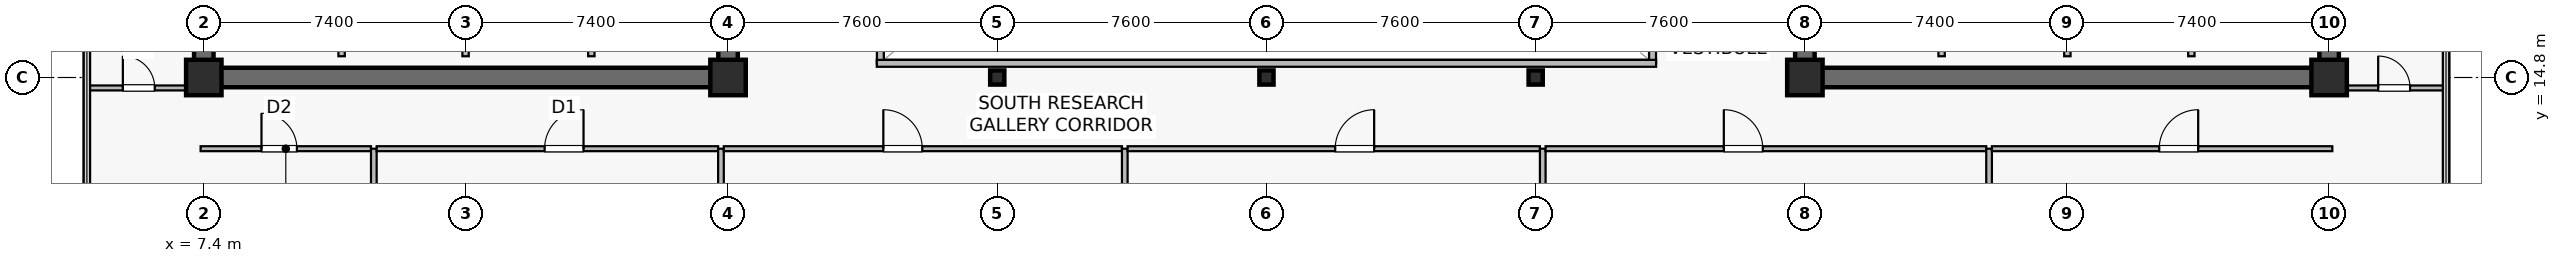
"""IFC4 building model, lengths in metres.
Left out: names, types, materials, properties, quantities, classifications, styles, units other than length and angle.
Written with IfcOpenShell. Run it as: python <this file> out.ifc"""

import sys

from ifc_helpers import new_model, si_unit, direction, frame, frame_2d, origin, origin_2d, place, context, subcontext, project, spatial, rectangle, hollow_rectangle, extrude, source, transform, mapped, element, fill, save


model = new_model("IFC4")
c1 = context("Model", 3, precision=1e-05, world=origin(), true_north=direction((0.0, 1.0)))
c2 = subcontext(c1, "Body", "Model", "MODEL_VIEW")
j1 = project(units=[si_unit("LENGTHUNIT", "METRE"), si_unit("PLANEANGLEUNIT", "RADIAN")], contexts=[c1])
p1 = place(None, origin())
s1 = spatial("IfcSite", under=j1, at=p1, CompositionType="ELEMENT")
p2 = place(p1, origin())
s2 = spatial("IfcBuilding", under=s1, at=p2, CompositionType="ELEMENT")
p3 = place(p2, frame((0.0, 0.0, 209.6)))
s3 = spatial("IfcBuildingStorey", under=s2, at=p3, CompositionType="ELEMENT", Elevation=209.6)
p4 = place(p3, frame((7.125, 14.8, 0.0), z_axis=(0.0, 0.0, 1.0), x_axis=(1.0, 0.0, 0.0)))
e1 = element("IfcWall", 1, at=p4, inside=s3, PredefinedType="SHEAR", context=c2, shape_type="SweptSolid", body=[
    extrude(rectangle(XDim=15.35, YDim=0.55, at=frame_2d((7.675, 0.0))), origin(), (0.0, 0.0, 1.0), 3.8),
])
p5 = place(p3, frame((7.4, 15.075, 0.0), z_axis=(0.0, 0.0, 1.0), x_axis=(0.0, 1.0, 0.0)))
e2 = element("IfcWall", 2, at=p5, inside=s3, PredefinedType="SHEAR", context=c2, shape_type="SweptSolid", body=[
    extrude(rectangle(XDim=18.45, YDim=0.55, at=frame_2d((9.225, 0.0))), origin(), (0.0, 0.0, 1.0), 3.8),
])
p6 = place(p3, frame((22.2, 15.075, 0.0), z_axis=(0.0, 0.0, 1.0), x_axis=(0.0, 1.0, 0.0)))
e3 = element("IfcWall", 3, at=p6, inside=s3, PredefinedType="SHEAR", context=c2, shape_type="SweptSolid", body=[
    extrude(rectangle(XDim=18.45, YDim=0.55, at=frame_2d((9.225, 0.0))), origin(), (0.0, 0.0, 1.0), 3.8),
])
p7 = place(p6, frame((3.475, 0.0, 0.0)))
e4 = element("IfcOpeningElement", 4, at=p7, cuts=e3, PredefinedType="OPENING", context=c2, shape_type="SweptSolid", body=[
    extrude(rectangle(XDim=1.42, YDim=2.2, at=frame_2d((0.71, 1.1))), frame((0.0, 0.285, 0.0), z_axis=(0.0, -1.0, 0.0), x_axis=(1.0, 0.0, 0.0)), (0.0, 0.0, 1.0), 0.57),
])
p8 = place(p3, frame((52.325, 14.8, 0.0), z_axis=(0.0, 0.0, 1.0), x_axis=(1.0, 0.0, 0.0)))
e5 = element("IfcWall", 5, at=p8, inside=s3, PredefinedType="SHEAR", context=c2, shape_type="SweptSolid", body=[
    extrude(rectangle(XDim=15.35, YDim=0.55, at=frame_2d((7.675, 0.0))), origin(), (0.0, 0.0, 1.0), 3.8),
])
p9 = place(p3, frame((52.6, 15.075, 0.0), z_axis=(0.0, 0.0, 1.0), x_axis=(0.0, 1.0, 0.0)))
e6 = element("IfcWall", 6, at=p9, inside=s3, PredefinedType="SHEAR", context=c2, shape_type="SweptSolid", body=[
    extrude(rectangle(XDim=18.45, YDim=0.55, at=frame_2d((9.225, 0.0))), origin(), (0.0, 0.0, 1.0), 3.8),
])
p10 = place(p9, frame((3.475, 0.0, 0.0)))
e7 = element("IfcOpeningElement", 7, at=p10, cuts=e6, PredefinedType="OPENING", context=c2, shape_type="SweptSolid", body=[
    extrude(rectangle(XDim=1.42, YDim=2.2, at=frame_2d((0.71, 1.1))), frame((0.0, 0.285, 0.0), z_axis=(0.0, -1.0, 0.0), x_axis=(1.0, 0.0, 0.0)), (0.0, 0.0, 1.0), 0.57),
])
p11 = place(p3, frame((67.4, 15.075, 0.0), z_axis=(0.0, 0.0, 1.0), x_axis=(0.0, 1.0, 0.0)))
e8 = element("IfcWall", 8, at=p11, inside=s3, PredefinedType="SHEAR", context=c2, shape_type="SweptSolid", body=[
    extrude(rectangle(XDim=18.45, YDim=0.55, at=frame_2d((9.225, 0.0))), origin(), (0.0, 0.0, 1.0), 3.8),
])
m1 = source(origin(), c2, "Body", "SweptSolid", [
    extrude(rectangle(XDim=1.0, YDim=1.0, at=origin_2d()), origin(), (0.0, 0.0, 1.0), 4.1),
])
for number, where, z_axis, x_axis in (
    (9, (7.4, 14.8, 0.0), (0.0, 0.0, 1.0), (1.0, 0.0, 0.0)),
    (10, (22.2, 14.8, 0.0), (0.0, 0.0, 1.0), (1.0, 0.0, 0.0)),
    (11, (52.6, 14.8, 0.0), (0.0, 0.0, 1.0), (1.0, 0.0, 0.0)),
    (12, (67.4, 14.8, 0.0), (0.0, 0.0, 1.0), (1.0, 0.0, 0.0)),
):
    element("IfcColumn", number, at=place(p3, frame(where, z_axis=z_axis, x_axis=x_axis)), inside=s3, PredefinedType="COLUMN", context=c2, shape_type="MappedRepresentation", body=[
        mapped(m1, transform((0.0, 0.0, 0.0), scale=1.0)),
    ])
m2 = source(origin(), c2, "Body", "SweptSolid", [
    extrude(hollow_rectangle(XDim=0.4, YDim=0.4, WallThickness=0.019, at=origin_2d()), origin(), (0.0, 0.0, 1.0), 4.1),
])
for number, where, z_axis, x_axis in (
    (13, (29.8, 14.8, 0.0), (0.0, 0.0, 1.0), (1.0, 0.0, 0.0)),
    (14, (37.4, 14.8, 0.0), (0.0, 0.0, 1.0), (1.0, 0.0, 0.0)),
    (15, (45.0, 14.8, 0.0), (0.0, 0.0, 1.0), (1.0, 0.0, 0.0)),
):
    element("IfcColumn", number, at=place(p3, frame(where, z_axis=z_axis, x_axis=x_axis)), inside=s3, PredefinedType="COLUMN", context=c2, shape_type="MappedRepresentation", body=[
        mapped(m2, transform((0.0, 0.0, 0.0), scale=1.0)),
    ])
p12 = place(p3, frame((11.29, 15.4, 0.0), z_axis=(0.0, 0.0, 1.0), x_axis=(0.0, 1.0, 0.0)))
e16 = element("IfcWall", 16, at=p12, inside=s3, PredefinedType="SOLIDWALL", context=c2, shape_type="SweptSolid", body=[
    extrude(rectangle(XDim=2.4, YDim=0.18, at=frame_2d((1.2, 0.0))), origin(), (0.0, 0.0, 1.0), 3.8),
])
p13 = place(p3, frame((14.79, 15.4, 0.0), z_axis=(0.0, 0.0, 1.0), x_axis=(0.0, 1.0, 0.0)))
e17 = element("IfcWall", 17, at=p13, inside=s3, PredefinedType="SOLIDWALL", context=c2, shape_type="SweptSolid", body=[
    extrude(rectangle(XDim=2.4, YDim=0.18, at=frame_2d((1.2, 0.0))), origin(), (0.0, 0.0, 1.0), 3.197),
])
for number, where, z_axis, x_axis in (
    (18, (18.34, 15.4, 0.0), (0.0, 0.0, 1.0), (0.0, 1.0, 0.0)),
    (19, (63.51, 15.4, 0.0), (0.0, 0.0, 1.0), (0.0, 1.0, 0.0)),
):
    element("IfcWall", number, at=place(p3, frame(where, z_axis=z_axis, x_axis=x_axis)), inside=s3, PredefinedType="SOLIDWALL", context=c2, shape_type="SweptSolid", body=[
        extrude(rectangle(XDim=2.4, YDim=0.18, at=frame_2d((1.2, 0.0))), origin(), (0.0, 0.0, 1.0), 3.8),
    ])
p14 = place(p3, frame((60.01, 15.4, 0.0), z_axis=(0.0, 0.0, 1.0), x_axis=(0.0, 1.0, 0.0)))
e20 = element("IfcWall", 20, at=p14, inside=s3, PredefinedType="SOLIDWALL", context=c2, shape_type="SweptSolid", body=[
    extrude(rectangle(XDim=2.4, YDim=0.18, at=frame_2d((1.2, 0.0))), origin(), (0.0, 0.0, 1.0), 3.197),
])
p15 = place(p3, frame((56.46, 15.4, 0.0), z_axis=(0.0, 0.0, 1.0), x_axis=(0.0, 1.0, 0.0)))
e21 = element("IfcWall", 21, at=p15, inside=s3, PredefinedType="SOLIDWALL", context=c2, shape_type="SweptSolid", body=[
    extrude(rectangle(XDim=2.4, YDim=0.18, at=frame_2d((1.2, 0.0))), origin(), (0.0, 0.0, 1.0), 3.8),
])
p16 = place(p3, frame((26.5, 15.2, 0.0), z_axis=(0.0, 0.0, 1.0), x_axis=(0.0, 1.0, 0.0)))
e22 = element("IfcWall", 22, at=p16, inside=s3, PredefinedType="SOLIDWALL", context=c2, shape_type="SweptSolid", body=[
    extrude(rectangle(XDim=18.2, YDim=0.195, at=frame_2d((9.1, 0.0))), origin(), (0.0, 0.0, 1.0), 3.8),
])
p17 = place(p16, frame((1.8, 0.0, 0.9)))
e23 = element("IfcOpeningElement", 23, at=p17, cuts=e22, PredefinedType="OPENING", context=c2, shape_type="SweptSolid", body=[
    extrude(rectangle(XDim=1.5, YDim=1.4, at=frame_2d((0.75, 0.7))), frame((0.0, 0.107, 0.0), z_axis=(0.0, -1.0, 0.0), x_axis=(1.0, 0.0, 0.0)), (0.0, 0.0, 1.0), 0.215),
])
p18 = place(p16, frame((13.2, 0.0, 0.9)))
e24 = element("IfcOpeningElement", 24, at=p18, cuts=e22, PredefinedType="OPENING", context=c2, shape_type="SweptSolid", body=[
    extrude(rectangle(XDim=1.5, YDim=1.4, at=frame_2d((0.75, 0.7))), frame((0.0, 0.107, 0.0), z_axis=(0.0, -1.0, 0.0), x_axis=(1.0, 0.0, 0.0)), (0.0, 0.0, 1.0), 0.215),
])
p19 = place(p3, frame((48.3, 15.2, 0.0), z_axis=(0.0, 0.0, 1.0), x_axis=(0.0, 1.0, 0.0)))
e25 = element("IfcWall", 25, at=p19, inside=s3, PredefinedType="SOLIDWALL", context=c2, shape_type="SweptSolid", body=[
    extrude(rectangle(XDim=18.2, YDim=0.195, at=frame_2d((9.1, 0.0))), origin(), (0.0, 0.0, 1.0), 3.8),
])
p20 = place(p19, frame((1.8, 0.0, 0.9)))
e26 = element("IfcOpeningElement", 26, at=p20, cuts=e25, PredefinedType="OPENING", context=c2, shape_type="SweptSolid", body=[
    extrude(rectangle(XDim=1.5, YDim=1.4, at=frame_2d((0.75, 0.7))), frame((0.0, 0.107, 0.0), z_axis=(0.0, -1.0, 0.0), x_axis=(1.0, 0.0, 0.0)), (0.0, 0.0, 1.0), 0.215),
])
p21 = place(p19, frame((13.2, 0.0, 0.9)))
e27 = element("IfcOpeningElement", 27, at=p21, cuts=e25, PredefinedType="OPENING", context=c2, shape_type="SweptSolid", body=[
    extrude(rectangle(XDim=1.5, YDim=1.4, at=frame_2d((0.75, 0.7))), frame((0.0, 0.107, 0.0), z_axis=(0.0, -1.0, 0.0), x_axis=(1.0, 0.0, 0.0)), (0.0, 0.0, 1.0), 0.215),
])
p22 = place(p3, frame((26.4, 15.2, 0.0), z_axis=(0.0, 0.0, 1.0), x_axis=(1.0, 0.0, 0.0)))
e28 = element("IfcWall", 28, at=p22, inside=s3, PredefinedType="SOLIDWALL", context=c2, shape_type="SweptSolid", body=[
    extrude(rectangle(XDim=22.0, YDim=0.195, at=frame_2d((11.0, 0.0))), origin(), (0.0, 0.0, 1.0), 3.8),
])
p23 = place(p3, frame((7.31, 12.79, 0.0), z_axis=(0.0, 0.0, 1.0), x_axis=(1.0, 0.0, 0.0)))
e29 = element("IfcWall", 29, at=p23, inside=s3, PredefinedType="PARTITIONING", context=c2, shape_type="SweptSolid", body=[
    extrude(rectangle(XDim=4.81, YDim=0.14, at=frame_2d((2.405, 0.0))), origin(), (0.0, 0.0, 1.0), 3.335),
])
p24 = place(p23, frame((1.719, 0.0, 0.0)))
e30 = element("IfcOpeningElement", 30, at=p24, cuts=e29, PredefinedType="OPENING", context=c2, shape_type="SweptSolid", body=[
    extrude(rectangle(XDim=1.0, YDim=2.15, at=frame_2d((0.5, 1.075))), frame((0.0, 0.08, 0.0), z_axis=(0.0, -1.0, 0.0), x_axis=(1.0, 0.0, 0.0)), (0.0, 0.0, 1.0), 0.16),
])
p25 = place(p3, frame((12.2, 2.71, 0.0), z_axis=(0.0, 0.0, 1.0), x_axis=(0.0, 1.0, 0.0)))
e31 = element("IfcWall", 31, at=p25, inside=s3, PredefinedType="PARTITIONING", context=c2, shape_type="SweptSolid", body=[
    extrude(rectangle(XDim=10.08, YDim=0.16, at=frame_2d((5.04, 0.0))), origin(), (0.0, 0.0, 1.0), 3.135),
])
p26 = place(p3, frame((12.28, 12.79, 0.0), z_axis=(0.0, 0.0, 1.0), x_axis=(1.0, 0.0, 0.0)))
e32 = element("IfcWall", 32, at=p26, inside=s3, PredefinedType="PARTITIONING", context=c2, shape_type="SweptSolid", body=[
    extrude(rectangle(XDim=9.64, YDim=0.14, at=frame_2d((4.82, 0.0))), origin(), (0.0, 0.0, 1.0), 3.197),
])
p27 = place(p26, frame((4.74, 0.0, 0.0)))
e33 = element("IfcOpeningElement", 33, at=p27, cuts=e32, PredefinedType="OPENING", context=c2, shape_type="SweptSolid", body=[
    extrude(rectangle(XDim=1.1, YDim=2.18, at=frame_2d((0.55, 1.09))), frame((0.0, 0.08, 0.0), z_axis=(0.0, -1.0, 0.0), x_axis=(1.0, 0.0, 0.0)), (0.0, 0.0, 1.0), 0.16),
])
p28 = place(p3, frame((22.0, 2.71, 0.0), z_axis=(0.0, 0.0, 1.0), x_axis=(0.0, 1.0, 0.0)))
e34 = element("IfcWall", 34, at=p28, inside=s3, PredefinedType="PARTITIONING", context=c2, shape_type="SweptSolid", body=[
    extrude(rectangle(XDim=10.08, YDim=0.16, at=frame_2d((5.04, 0.0))), origin(), (0.0, 0.0, 1.0), 3.135),
])
p29 = place(p3, frame((22.08, 12.79, 0.0), z_axis=(0.0, 0.0, 1.0), x_axis=(1.0, 0.0, 0.0)))
e35 = element("IfcWall", 35, at=p29, inside=s3, PredefinedType="PARTITIONING", context=c2, shape_type="SweptSolid", body=[
    extrude(rectangle(XDim=11.24, YDim=0.14, at=frame_2d((5.62, 0.0))), origin(), (0.0, 0.0, 1.0), 3.197),
])
p30 = place(p29, frame((4.504, 0.0, 0.0)))
e36 = element("IfcOpeningElement", 36, at=p30, cuts=e35, PredefinedType="OPENING", context=c2, shape_type="SweptSolid", body=[
    extrude(rectangle(XDim=1.1, YDim=2.18, at=frame_2d((0.55, 1.09))), frame((0.0, 0.08, 0.0), z_axis=(0.0, -1.0, 0.0), x_axis=(1.0, 0.0, 0.0)), (0.0, 0.0, 1.0), 0.16),
])
p31 = place(p3, frame((33.4, 3.91, 0.0), z_axis=(0.0, 0.0, 1.0), x_axis=(0.0, 1.0, 0.0)))
e37 = element("IfcWall", 37, at=p31, inside=s3, PredefinedType="PARTITIONING", context=c2, shape_type="SweptSolid", body=[
    extrude(rectangle(XDim=8.88, YDim=0.16, at=frame_2d((4.44, 0.0))), origin(), (0.0, 0.0, 1.0), 3.135),
])
p32 = place(p3, frame((33.48, 12.79, 0.0), z_axis=(0.0, 0.0, 1.0), x_axis=(1.0, 0.0, 0.0)))
e38 = element("IfcWall", 38, at=p32, inside=s3, PredefinedType="PARTITIONING", context=c2, shape_type="SweptSolid", body=[
    extrude(rectangle(XDim=11.64, YDim=0.14, at=frame_2d((5.82, 0.0))), origin(), (0.0, 0.0, 1.0), 3.197),
])
p33 = place(p32, frame((5.86, 0.0, 0.0)))
e39 = element("IfcOpeningElement", 39, at=p33, cuts=e38, PredefinedType="OPENING", context=c2, shape_type="SweptSolid", body=[
    extrude(rectangle(XDim=1.1, YDim=2.18, at=frame_2d((0.55, 1.09))), frame((0.0, 0.08, 0.0), z_axis=(0.0, -1.0, 0.0), x_axis=(1.0, 0.0, 0.0)), (0.0, 0.0, 1.0), 0.16),
])
p34 = place(p3, frame((45.2, 3.91, 0.0), z_axis=(0.0, 0.0, 1.0), x_axis=(0.0, 1.0, 0.0)))
e40 = element("IfcWall", 40, at=p34, inside=s3, PredefinedType="PARTITIONING", context=c2, shape_type="SweptSolid", body=[
    extrude(rectangle(XDim=8.88, YDim=0.16, at=frame_2d((4.44, 0.0))), origin(), (0.0, 0.0, 1.0), 3.135),
])
p35 = place(p3, frame((45.28, 12.79, 0.0), z_axis=(0.0, 0.0, 1.0), x_axis=(1.0, 0.0, 0.0)))
e41 = element("IfcWall", 41, at=p35, inside=s3, PredefinedType="PARTITIONING", context=c2, shape_type="SweptSolid", body=[
    extrude(rectangle(XDim=12.44, YDim=0.14, at=frame_2d((6.22, 0.0))), origin(), (0.0, 0.0, 1.0), 3.197),
])
p36 = place(p35, frame((5.031, 0.0, 0.0)))
e42 = element("IfcOpeningElement", 42, at=p36, cuts=e41, PredefinedType="OPENING", context=c2, shape_type="SweptSolid", body=[
    extrude(rectangle(XDim=1.1, YDim=2.18, at=frame_2d((0.55, 1.09))), frame((0.0, 0.08, 0.0), z_axis=(0.0, -1.0, 0.0), x_axis=(1.0, 0.0, 0.0)), (0.0, 0.0, 1.0), 0.16),
])
p37 = place(p3, frame((57.8, 2.71, 0.0), z_axis=(0.0, 0.0, 1.0), x_axis=(0.0, 1.0, 0.0)))
e43 = element("IfcWall", 43, at=p37, inside=s3, PredefinedType="PARTITIONING", context=c2, shape_type="SweptSolid", body=[
    extrude(rectangle(XDim=10.08, YDim=0.16, at=frame_2d((5.04, 0.0))), origin(), (0.0, 0.0, 1.0), 3.135),
])
p38 = place(p3, frame((57.88, 12.79, 0.0), z_axis=(0.0, 0.0, 1.0), x_axis=(1.0, 0.0, 0.0)))
e44 = element("IfcWall", 44, at=p38, inside=s3, PredefinedType="PARTITIONING", context=c2, shape_type="SweptSolid", body=[
    extrude(rectangle(XDim=9.61, YDim=0.14, at=frame_2d((4.805, 0.0))), origin(), (0.0, 0.0, 1.0), 3.197),
])
p39 = place(p38, frame((4.724, 0.0, 0.0)))
e45 = element("IfcOpeningElement", 45, at=p39, cuts=e44, PredefinedType="OPENING", context=c2, shape_type="SweptSolid", body=[
    extrude(rectangle(XDim=1.1, YDim=2.18, at=frame_2d((0.55, 1.09))), frame((0.0, 0.08, 0.0), z_axis=(0.0, -1.0, 0.0), x_axis=(1.0, 0.0, 0.0)), (0.0, 0.0, 1.0), 0.16),
])
p40 = place(p3, frame((4.11, 14.505, 0.0), z_axis=(0.0, 0.0, 1.0), x_axis=(1.0, 0.0, 0.0)))
e46 = element("IfcWall", 46, at=p40, inside=s3, PredefinedType="PARTITIONING", context=c2, shape_type="SweptSolid", body=[
    extrude(rectangle(XDim=2.91, YDim=0.14, at=frame_2d((1.455, 0.0))), origin(), (0.0, 0.0, 1.0), 3.8),
])
p41 = place(p40, frame((1.005, 0.0, 0.0)))
e47 = element("IfcOpeningElement", 47, at=p41, cuts=e46, PredefinedType="OPENING", context=c2, shape_type="SweptSolid", body=[
    extrude(rectangle(XDim=0.9, YDim=2.1, at=frame_2d((0.45, 1.05))), frame((0.0, 0.08, 0.0), z_axis=(0.0, -1.0, 0.0), x_axis=(1.0, 0.0, 0.0)), (0.0, 0.0, 1.0), 0.16),
])
p42 = place(p3, frame((67.78, 14.505, 0.0), z_axis=(0.0, 0.0, 1.0), x_axis=(1.0, 0.0, 0.0)))
e48 = element("IfcWall", 48, at=p42, inside=s3, PredefinedType="PARTITIONING", context=c2, shape_type="SweptSolid", body=[
    extrude(rectangle(XDim=2.91, YDim=0.14, at=frame_2d((1.455, 0.0))), origin(), (0.0, 0.0, 1.0), 3.8),
])
p43 = place(p42, frame((1.005, 0.0, 0.0)))
e49 = element("IfcOpeningElement", 49, at=p43, cuts=e48, PredefinedType="OPENING", context=c2, shape_type="SweptSolid", body=[
    extrude(rectangle(XDim=0.9, YDim=2.1, at=frame_2d((0.45, 1.05))), frame((0.0, 0.08, 0.0), z_axis=(0.0, -1.0, 0.0), x_axis=(1.0, 0.0, 0.0)), (0.0, 0.0, 1.0), 0.16),
])
m3 = source(origin(), c2, "Body", "SweptSolid", [
    extrude(rectangle(XDim=1.0, YDim=2.15, at=frame_2d((0.5, 1.075))), frame((0.0, 0.025, 0.0), z_axis=(0.0, -1.0, 0.0), x_axis=(1.0, 0.0, 0.0)), (0.0, 0.0, 1.0), 0.05),
])
p44 = place(p24, origin())
e50 = element("IfcDoor", 50, at=p44, inside=s3, OperationType="SINGLE_SWING_LEFT", PredefinedType="DOOR", context=c2, shape_type="MappedRepresentation", body=[
    mapped(m3, transform((0.0, 0.0, 0.0), scale=1.0)),
])
fill(e30, e50)
m4 = source(origin(), c2, "Body", "SweptSolid", [
    extrude(rectangle(XDim=1.1, YDim=2.18, at=frame_2d((0.55, 1.09))), frame((0.0, 0.025, 0.0), z_axis=(0.0, -1.0, 0.0), x_axis=(1.0, 0.0, 0.0)), (0.0, 0.0, 1.0), 0.05),
])
p45 = place(p27, origin())
e51 = element("IfcDoor", 51, at=p45, inside=s3, OperationType="SINGLE_SWING_RIGHT", PredefinedType="DOOR", context=c2, shape_type="MappedRepresentation", body=[
    mapped(m4, transform((0.0, 0.0, 0.0), scale=1.0)),
])
fill(e33, e51)
p46 = place(p30, origin())
e52 = element("IfcDoor", 52, at=p46, inside=s3, OperationType="SINGLE_SWING_LEFT", PredefinedType="DOOR", context=c2, shape_type="MappedRepresentation", body=[
    mapped(m4, transform((0.0, 0.0, 0.0), scale=1.0)),
])
fill(e36, e52)
p47 = place(p33, origin())
e53 = element("IfcDoor", 53, at=p47, inside=s3, OperationType="SINGLE_SWING_RIGHT", PredefinedType="DOOR", context=c2, shape_type="MappedRepresentation", body=[
    mapped(m4, transform((0.0, 0.0, 0.0), scale=1.0)),
])
fill(e39, e53)
p48 = place(p36, origin())
e54 = element("IfcDoor", 54, at=p48, inside=s3, OperationType="SINGLE_SWING_LEFT", PredefinedType="DOOR", context=c2, shape_type="MappedRepresentation", body=[
    mapped(m4, transform((0.0, 0.0, 0.0), scale=1.0)),
])
fill(e42, e54)
p49 = place(p39, origin())
e55 = element("IfcDoor", 55, at=p49, inside=s3, OperationType="SINGLE_SWING_RIGHT", PredefinedType="DOOR", context=c2, shape_type="MappedRepresentation", body=[
    mapped(m4, transform((0.0, 0.0, 0.0), scale=1.0)),
])
fill(e45, e55)
m5 = source(origin(), c2, "Body", "SweptSolid", [
    extrude(rectangle(XDim=0.9, YDim=2.1, at=frame_2d((0.45, 1.05))), frame((0.0, 0.025, 0.0), z_axis=(0.0, -1.0, 0.0), x_axis=(1.0, 0.0, 0.0)), (0.0, 0.0, 1.0), 0.05),
])
p50 = place(p41, origin())
e56 = element("IfcDoor", 56, at=p50, inside=s3, OperationType="SINGLE_SWING_LEFT", PredefinedType="DOOR", context=c2, shape_type="MappedRepresentation", body=[
    mapped(m5, transform((0.0, 0.0, 0.0), scale=1.0)),
])
fill(e47, e56)
p51 = place(p43, origin())
e57 = element("IfcDoor", 57, at=p51, inside=s3, OperationType="SINGLE_SWING_LEFT", PredefinedType="DOOR", context=c2, shape_type="MappedRepresentation", body=[
    mapped(m5, transform((0.0, 0.0, 0.0), scale=1.0)),
])
fill(e49, e57)
save(model, sys.argv[1])
